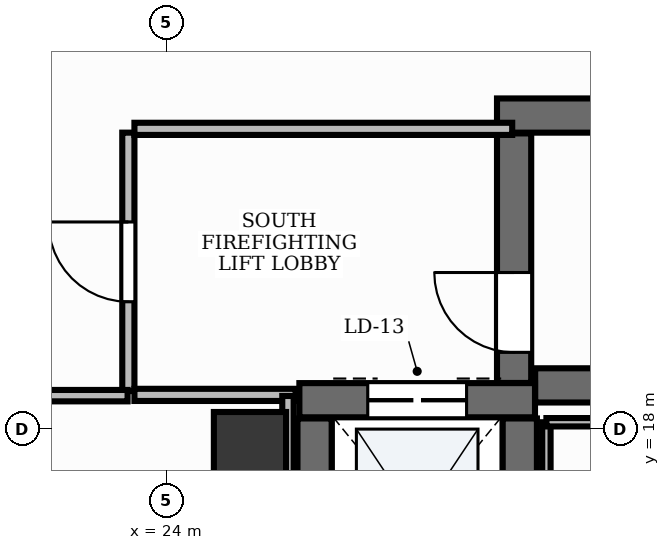
"""IFC4 building model, lengths in metres.
Left out: names, types, materials, properties, quantities, classifications, styles, units other than length and angle.
Written with IfcOpenShell. Run it as: python <this file> out.ifc"""

import sys

from ifc_helpers import new_model, si_unit, direction, frame, frame_2d, origin, origin_2d, place, context, subcontext, project, spatial, rectangle, extrude, element, fill, save


model = new_model("IFC4")
c1 = context("Model", 3, precision=1e-05, world=origin(), true_north=direction((0.0, 1.0)))
c2 = subcontext(c1, "Body", "Model", "MODEL_VIEW")
j1 = project(units=[si_unit("LENGTHUNIT", "METRE"), si_unit("PLANEANGLEUNIT", "RADIAN")], contexts=[c1])
p1 = place(None, origin())
s1 = spatial("IfcSite", under=j1, at=p1, CompositionType="ELEMENT")
p2 = place(p1, origin())
s2 = spatial("IfcBuilding", under=s1, at=p2, CompositionType="ELEMENT")
p3 = place(p2, frame((0.0, 0.0, 119.4)))
s3 = spatial("IfcBuildingStorey", under=s2, at=p3, CompositionType="ELEMENT", Elevation=119.4)
p4 = place(p3, frame((28.852, 18.575, 0.0), z_axis=(0.0, 0.0, 1.0), x_axis=(1.0, 0.0, 0.0)))
e1 = element("IfcWall", 1, at=p4, inside=s3, PredefinedType="SHEAR", context=c2, shape_type="SweptSolid", body=[
    extrude(rectangle(XDim=8.248, YDim=0.45, at=frame_2d((4.124, 0.0))), origin(), (0.0, 0.0, 1.0), 3.9),
])
p5 = place(p3, frame((28.35, 22.125, 0.0), z_axis=(0.0, 0.0, 1.0), x_axis=(1.0, 0.0, 0.0)))
e2 = element("IfcWall", 2, at=p5, inside=s3, PredefinedType="SHEAR", context=c2, shape_type="SweptSolid", body=[
    extrude(rectangle(XDim=8.75, YDim=0.45, at=frame_2d((4.375, 0.0))), origin(), (0.0, 0.0, 1.0), 3.9),
])
p6 = place(p3, frame((28.575, 18.607, 0.0), z_axis=(0.0, 0.0, 1.0), x_axis=(0.0, 1.0, 0.0)))
e3 = element("IfcWall", 3, at=p6, inside=s3, PredefinedType="SHEAR", context=c2, shape_type="SweptSolid", body=[
    extrude(rectangle(XDim=3.283, YDim=0.45, at=frame_2d((1.642, 0.0))), origin(), (0.0, 0.0, 1.0), 3.9),
])
p7 = place(p6, frame((0.403, 0.0, 0.0)))
e4 = element("IfcOpeningElement", 4, at=p7, cuts=e3, PredefinedType="OPENING", context=c2, shape_type="SweptSolid", body=[
    extrude(rectangle(XDim=1.05, YDim=2.15, at=frame_2d((0.525, 1.075))), frame((0.0, 0.24, 0.0), z_axis=(0.0, -1.0, 0.0), x_axis=(1.0, 0.0, 0.0)), (0.0, 0.0, 1.0), 0.48),
])
p8 = place(p3, frame((25.75, 18.38, 0.0), z_axis=(0.0, 0.0, 1.0), x_axis=(1.0, 0.0, 0.0)))
e5 = element("IfcWall", 5, at=p8, inside=s3, PredefinedType="SHEAR", context=c2, shape_type="SweptSolid", body=[
    extrude(rectangle(XDim=3.1, YDim=0.45, at=frame_2d((1.55, 0.0))), origin(), (0.0, 0.0, 1.0), 3.9),
])
p9 = place(p8, frame((0.9, 0.0, 0.0)))
e6 = element("IfcOpeningElement", 6, at=p9, cuts=e5, PredefinedType="OPENING", context=c2, shape_type="SweptSolid", body=[
    extrude(rectangle(XDim=1.3, YDim=2.2, at=frame_2d((0.65, 1.1))), frame((0.0, 0.24, 0.0), z_axis=(0.0, -1.0, 0.0), x_axis=(1.0, 0.0, 0.0)), (0.0, 0.0, 1.0), 0.48),
])
for number, where, z_axis, x_axis in (
    (7, (25.95, 15.44, 0.0), (0.0, 0.0, 1.0), (0.0, 1.0, 0.0)),
    (8, (28.65, 15.44, 0.0), (0.0, 0.0, 1.0), (0.0, 1.0, 0.0)),
):
    element("IfcWall", number, at=place(p3, frame(where, z_axis=z_axis, x_axis=x_axis)), inside=s3, PredefinedType="SHEAR", context=c2, shape_type="SweptSolid", body=[
        extrude(rectangle(XDim=2.7, YDim=0.45, at=frame_2d((1.35, 0.0))), origin(), (0.0, 0.0, 1.0), 3.9),
    ])
p10 = place(p3, frame((25.1, 17.75, -0.0), z_axis=(0.0, 0.0, 1.0), x_axis=(1.0, 0.0, 0.0)))
e9 = element("IfcColumn", 9, at=p10, inside=s3, PredefinedType="PILASTER", context=c2, shape_type="SweptSolid", body=[
    extrude(rectangle(XDim=0.95, YDim=0.95, at=origin_2d()), origin(), (0.0, 0.0, 1.0), 3.901),
])
p11 = place(p3, frame((23.5, 18.5, 0.0), z_axis=(0.0, 0.0, 1.0), x_axis=(0.0, 1.0, 0.0)))
e10 = element("IfcWall", 10, at=p11, inside=s3, PredefinedType="PARTITIONING", context=c2, shape_type="SweptSolid", body=[
    extrude(rectangle(XDim=3.4, YDim=0.16, at=frame_2d((1.7, 0.0))), origin(), (0.0, 0.0, 1.0), 2.91),
])
p12 = place(p11, frame((1.175, 0.0, 0.0)))
e11 = element("IfcOpeningElement", 11, at=p12, cuts=e10, PredefinedType="OPENING", context=c2, shape_type="SweptSolid", body=[
    extrude(rectangle(XDim=1.05, YDim=2.15, at=frame_2d((0.525, 1.075))), frame((0.0, 0.095, 0.0), z_axis=(0.0, -1.0, 0.0), x_axis=(1.0, 0.0, 0.0)), (0.0, 0.0, 1.0), 0.19),
])
p13 = place(p3, frame((23.58, 21.95, 0.0), z_axis=(0.0, 0.0, 1.0), x_axis=(1.0, 0.0, 0.0)))
e12 = element("IfcWall", 12, at=p13, inside=s3, PredefinedType="PARTITIONING", context=c2, shape_type="SweptSolid", body=[
    extrude(rectangle(XDim=4.97, YDim=0.16, at=frame_2d((2.485, 0.0))), origin(), (0.0, 0.0, 1.0), 2.91),
])
p14 = place(p3, frame((23.58, 18.45, 0.0), z_axis=(0.0, 0.0, 1.0), x_axis=(1.0, 0.0, 0.0)))
e13 = element("IfcWall", 13, at=p14, inside=s3, PredefinedType="PARTITIONING", context=c2, shape_type="SweptSolid", body=[
    extrude(rectangle(XDim=2.12, YDim=0.16, at=frame_2d((1.06, 0.0))), origin(), (0.0, 0.0, 1.0), 2.91),
])
p15 = place(p3, frame((18.496, 18.44, 0.0), z_axis=(0.0, 0.0, 1.0), x_axis=(1.0, 0.0, 0.0)))
e14 = element("IfcWall", 14, at=p15, inside=s3, PredefinedType="PARTITIONING", context=c2, shape_type="SweptSolid", body=[
    extrude(rectangle(XDim=4.994, YDim=0.15, at=frame_2d((2.497, 0.0))), origin(), (0.0, 0.0, 1.0), 2.91),
])
p16 = place(p15, frame((2.135, 0.0, 0.0)))
e15 = element("IfcOpeningElement", 15, at=p16, cuts=e14, PredefinedType="OPENING", context=c2, shape_type="SweptSolid", body=[
    extrude(rectangle(XDim=0.95, YDim=2.15, at=frame_2d((0.475, 1.075))), frame((0.0, 0.09, 0.0), z_axis=(0.0, -1.0, 0.0), x_axis=(1.0, 0.0, 0.0)), (0.0, 0.0, 1.0), 0.18),
])
p17 = place(p3, frame((25.6, 18.436, 0.0), z_axis=(0.0, 0.0, 1.0), x_axis=(0.0, -1.0, 0.0)))
e16 = element("IfcWall", 16, at=p17, inside=s3, PredefinedType="PARTITIONING", context=c2, shape_type="SweptSolid", body=[
    extrude(rectangle(XDim=2.441, YDim=0.15, at=frame_2d((1.22, 0.0))), origin(), (0.0, 0.0, 1.0), 2.91),
])
p18 = place(p3, frame((29.0, 14.954, 0.0), z_axis=(0.0, 0.0, 1.0), x_axis=(0.0, 1.0, 0.0)))
e17 = element("IfcWall", 17, at=p18, inside=s3, PredefinedType="MOVABLE", context=c2, shape_type="SweptSolid", body=[
    extrude(rectangle(XDim=3.136, YDim=0.11, at=frame_2d((1.568, 0.0))), origin(), (0.0, 0.0, 1.0), 2.91),
])
p19 = place(p3, frame((29.0, 18.09, 0.0), z_axis=(0.0, 0.0, 1.0), x_axis=(1.0, 0.0, 0.0)))
e18 = element("IfcWall", 18, at=p19, inside=s3, PredefinedType="MOVABLE", context=c2, shape_type="SweptSolid", body=[
    extrude(rectangle(XDim=7.924, YDim=0.11, at=frame_2d((3.962, 0.0))), origin(), (0.0, 0.0, 1.0), 2.91),
])
p20 = place(p7, origin())
e19 = element("IfcDoor", 19, at=p20, inside=s3, OperationType="SINGLE_SWING_RIGHT", PredefinedType="DOOR", context=c2, shape_type="SweptSolid", body=[
    extrude(rectangle(XDim=1.05, YDim=2.15, at=frame_2d((0.525, 1.075))), frame((0.0, 0.025, 0.0), z_axis=(0.0, -1.0, 0.0), x_axis=(1.0, 0.0, 0.0)), (0.0, 0.0, 1.0), 0.05),
])
fill(e4, e19)
p21 = place(p9, origin())
e20 = element("IfcDoor", 20, at=p21, inside=s3, OperationType="DOUBLE_DOOR_SLIDING", PredefinedType="DOOR", context=c2, shape_type="SweptSolid", body=[
    extrude(rectangle(XDim=1.3, YDim=2.2, at=frame_2d((0.65, 1.1))), frame((0.0, 0.025, 0.0), z_axis=(0.0, -1.0, 0.0), x_axis=(1.0, 0.0, 0.0)), (0.0, 0.0, 1.0), 0.05),
])
fill(e6, e20)
p22 = place(p12, origin())
e21 = element("IfcDoor", 21, at=p22, inside=s3, OperationType="SINGLE_SWING_RIGHT", PredefinedType="DOOR", context=c2, shape_type="SweptSolid", body=[
    extrude(rectangle(XDim=1.05, YDim=2.15, at=frame_2d((0.525, 1.075))), frame((0.0, 0.025, 0.0), z_axis=(0.0, -1.0, 0.0), x_axis=(1.0, 0.0, 0.0)), (0.0, 0.0, 1.0), 0.05),
])
fill(e11, e21)
save(model, sys.argv[1])
